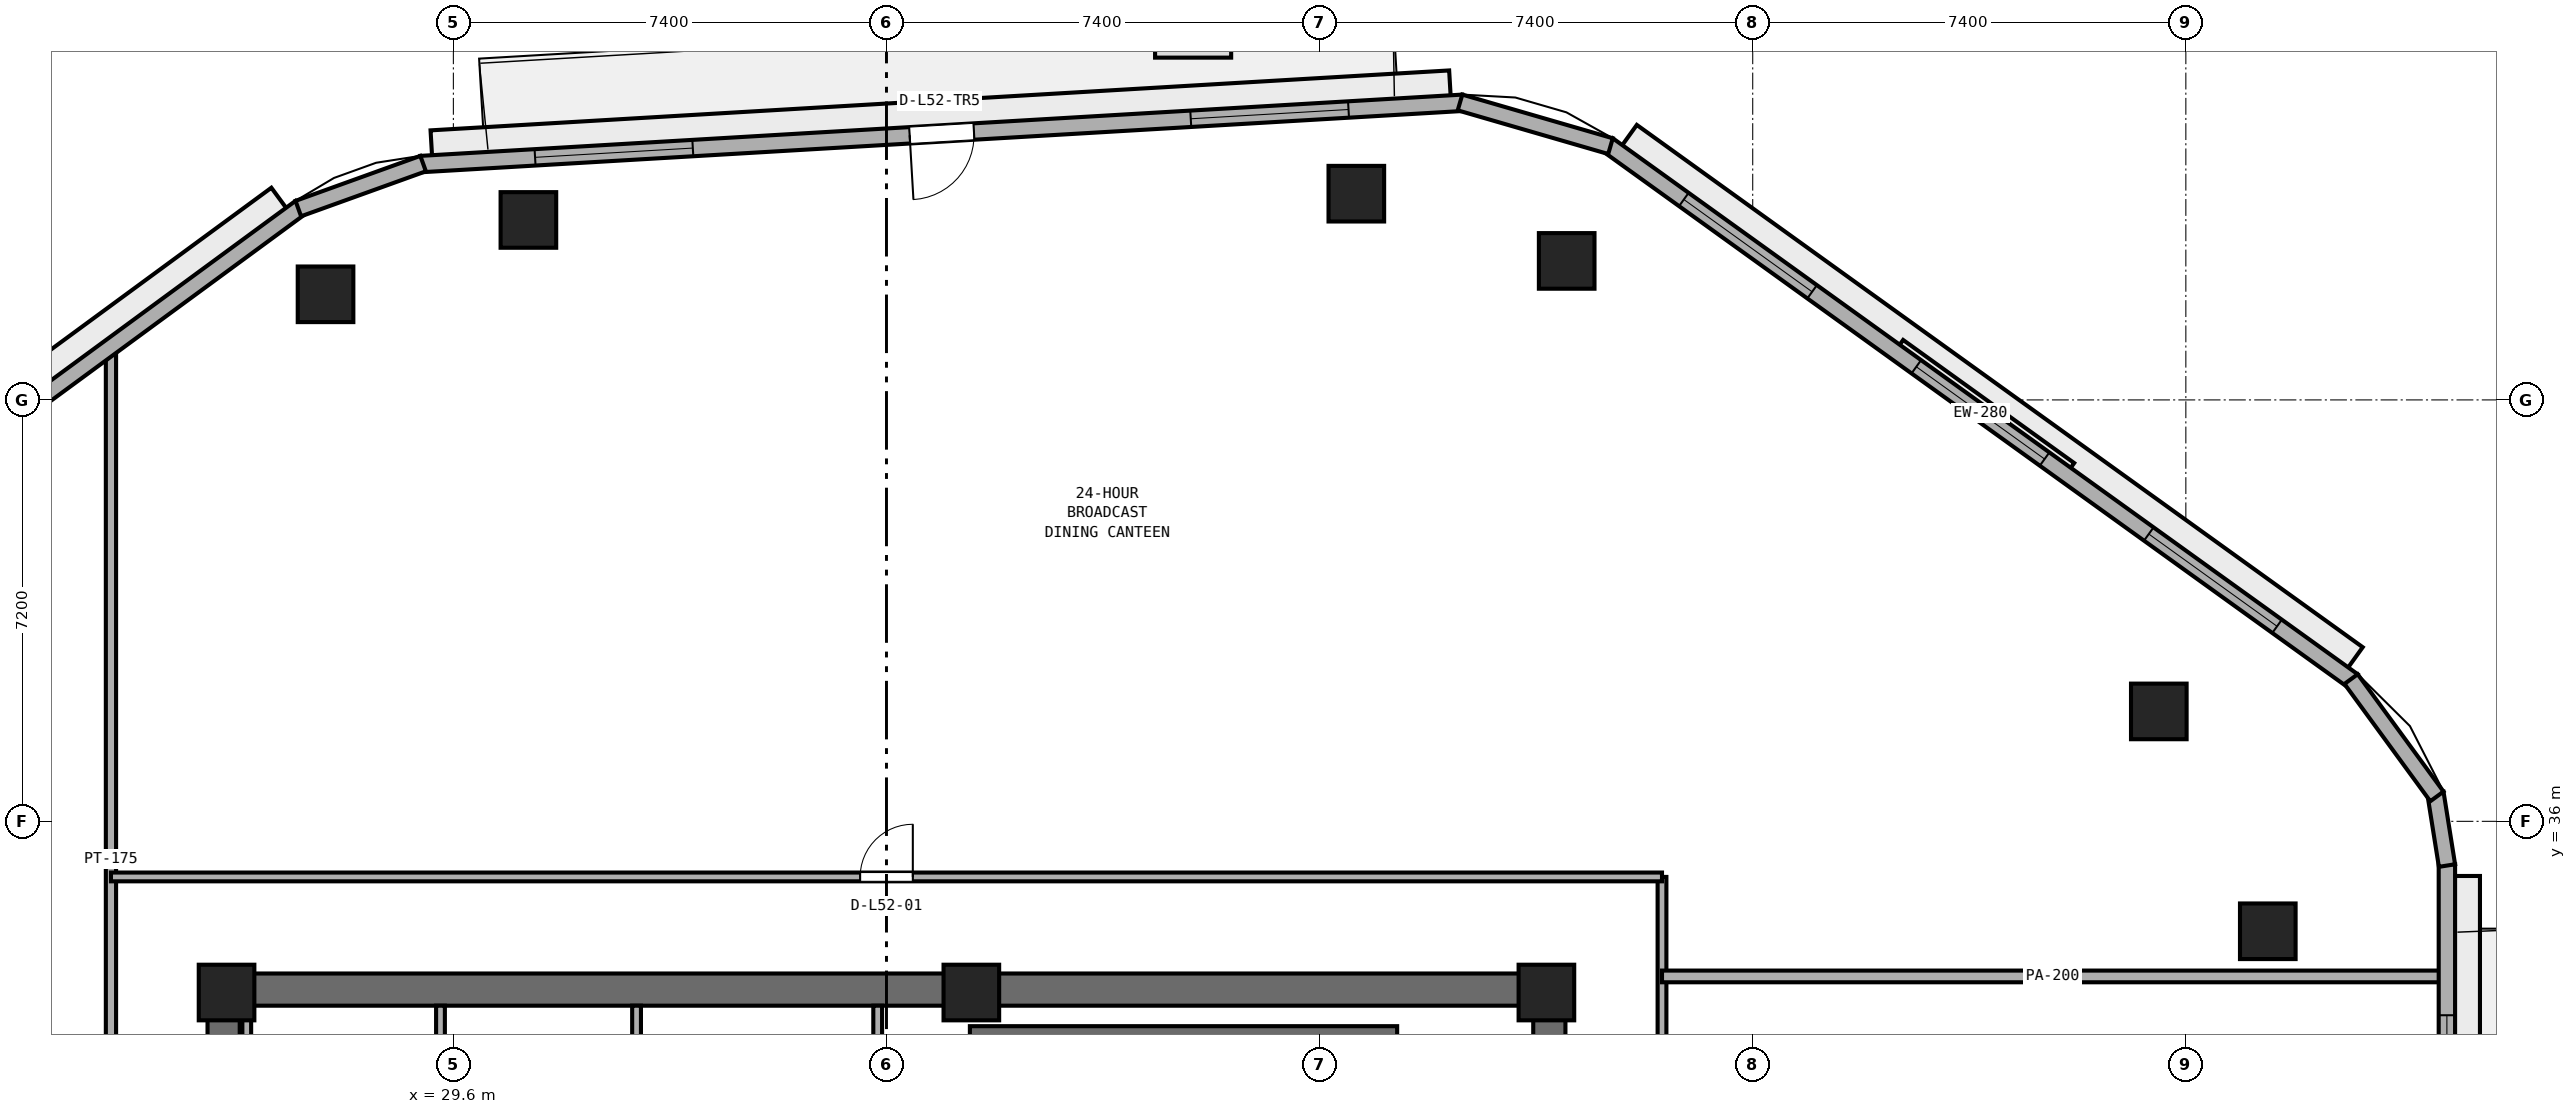
"""IFC4 building model, lengths in metres.
Left out: names, types, materials, properties, quantities, classifications, styles, units other than length and angle.
Written with IfcOpenShell. Run it as: python <this file> out.ifc"""

import sys

from ifc_helpers import new_model, si_unit, direction, frame, frame_2d, origin, origin_2d, place, context, subcontext, project, spatial, rectangle, extrude, element, fill, save


model = new_model("IFC4")
c1 = context("Model", 3, precision=1e-05, world=origin(), true_north=direction((0.0, 1.0)))
c2 = subcontext(c1, "Body", "Model", "MODEL_VIEW")
j1 = project(units=[si_unit("LENGTHUNIT", "METRE"), si_unit("PLANEANGLEUNIT", "RADIAN")], contexts=[c1])
p1 = place(None, origin())
s1 = spatial("IfcSite", under=j1, at=p1, CompositionType="ELEMENT")
p2 = place(p1, origin())
s2 = spatial("IfcBuilding", under=s1, at=p2, CompositionType="ELEMENT")
p3 = place(p2, frame((0.0, 0.0, 204.8)))
s3 = spatial("IfcBuildingStorey", under=s2, at=p3, CompositionType="ELEMENT", Elevation=204.8)
p4 = place(p3, frame((25.4, 33.125, 0.0), z_axis=(0.0, 0.0, 1.0), x_axis=(1.0, 0.0, 0.0)))
e1 = element("IfcWall", 1, at=p4, inside=s3, PredefinedType="SHEAR", context=c2, shape_type="SweptSolid", body=[
    extrude(rectangle(XDim=23.2, YDim=0.55, at=frame_2d((11.6, 0.0))), origin(), (0.0, 0.0, 1.0), 3.54),
])
p5 = place(p3, frame((25.675, 17.55, 0.0), z_axis=(0.0, 0.0, 1.0), x_axis=(0.0, 1.0, 0.0)))
e2 = element("IfcWall", 2, at=p5, inside=s3, PredefinedType="SHEAR", context=c2, shape_type="SweptSolid", body=[
    extrude(rectangle(XDim=15.3, YDim=0.55, at=frame_2d((7.65, 0.0))), origin(), (0.0, 0.0, 1.0), 3.54),
])
p6 = place(p5, frame((6.9, 0.0, 0.0)))
e3 = element("IfcOpeningElement", 3, at=p6, cuts=e2, PredefinedType="OPENING", context=c2, shape_type="SweptSolid", body=[
    extrude(rectangle(XDim=1.5, YDim=2.15, at=frame_2d((0.75, 1.075))), frame((0.0, 0.285, 0.0), z_axis=(0.0, -1.0, 0.0), x_axis=(1.0, 0.0, 0.0)), (0.0, 0.0, 1.0), 0.57),
])
p7 = place(p3, frame((48.325, 17.55, 0.0), z_axis=(0.0, 0.0, 1.0), x_axis=(0.0, 1.0, 0.0)))
e4 = element("IfcWall", 4, at=p7, inside=s3, PredefinedType="SHEAR", context=c2, shape_type="SweptSolid", body=[
    extrude(rectangle(XDim=15.3, YDim=0.55, at=frame_2d((7.65, 0.0))), origin(), (0.0, 0.0, 1.0), 3.54),
])
p8 = place(p7, frame((5.75, 0.0, 0.0)))
e5 = element("IfcOpeningElement", 5, at=p8, cuts=e4, PredefinedType="OPENING", context=c2, shape_type="SweptSolid", body=[
    extrude(rectangle(XDim=1.5, YDim=2.15, at=frame_2d((0.75, 1.075))), frame((0.0, 0.285, 0.0), z_axis=(0.0, -1.0, 0.0), x_axis=(1.0, 0.0, 0.0)), (0.0, 0.0, 1.0), 0.57),
])
for number, where, z_axis, x_axis in (
    (6, (48.275, 33.075, 0.0), (0.0, 0.0, 1.0), (1.0, 0.0, 0.0)),
    (7, (38.45, 33.075, 0.0), (0.0, 0.0, 1.0), (1.0, 0.0, 0.0)),
    (8, (25.725, 33.075, 0.0), (0.0, 0.0, 1.0), (1.0, 0.0, 0.0)),
):
    element("IfcColumn", number, at=place(p3, frame(where, z_axis=z_axis, x_axis=x_axis)), inside=s3, PredefinedType="PILASTER", context=c2, shape_type="SweptSolid", body=[
        extrude(rectangle(XDim=0.95, YDim=0.95, at=origin_2d()), origin(), (0.0, 0.0, 1.0), 3.8),
    ])
for number, where, z_axis, x_axis in (
    (9, (60.6, 34.122, 0.0), (0.0, 0.0, 1.0), (1.0, 0.0, 0.0)),
    (10, (58.738, 37.878, 0.0), (0.0, 0.0, 1.0), (1.0, 0.0, 0.0)),
    (11, (48.622, 45.575, 0.0), (0.0, 0.0, 1.0), (1.0, 0.0, 0.0)),
    (12, (45.028, 46.724, 0.0), (0.0, 0.0, 1.0), (1.0, 0.0, 0.0)),
    (13, (30.882, 46.275, 0.0), (0.0, 0.0, 1.0), (1.0, 0.0, 0.0)),
    (14, (27.416, 45.004, 0.0), (0.0, 0.0, 1.0), (1.0, 0.0, 0.0)),
):
    element("IfcColumn", number, at=place(p3, frame(where, z_axis=z_axis, x_axis=x_axis)), inside=s3, PredefinedType="COLUMN", context=c2, shape_type="SweptSolid", body=[
        extrude(rectangle(XDim=0.95, YDim=0.95, at=origin_2d()), origin(), (0.0, 0.0, 1.0), 3.8),
    ])
p9 = place(p3, frame((38.425, 32.375, 0.0), z_axis=(0.0, 0.0, 1.0), x_axis=(1.0, 0.0, 0.0)))
e15 = element("IfcWall", 15, at=p9, inside=s3, PredefinedType="SHEAR", context=c2, shape_type="SweptSolid", body=[
    extrude(rectangle(XDim=7.3, YDim=0.25, at=frame_2d((3.65, 0.0))), origin(), (0.0, 0.0, 1.0), 3.54),
])
p10 = place(p3, frame((26.07, 30.65, 0.0), z_axis=(0.0, 0.0, 1.0), x_axis=(0.0, 1.0, 0.0)))
e16 = element("IfcWall", 16, at=p10, inside=s3, PredefinedType="PARTITIONING", context=c2, shape_type="SweptSolid", body=[
    extrude(rectangle(XDim=2.2, YDim=0.15, at=frame_2d((1.1, 0.0))), origin(), (0.0, 0.0, 1.0), 2.64),
])
for number, where, z_axis, x_axis in (
    (17, (29.38, 30.65, 0.0), (0.0, 0.0, 1.0), (0.0, 1.0, 0.0)),
    (18, (32.73, 30.65, 0.0), (0.0, 0.0, 1.0), (0.0, 1.0, 0.0)),
    (19, (36.85, 30.65, 0.0), (0.0, 0.0, 1.0), (0.0, 1.0, 0.0)),
):
    element("IfcWall", number, at=place(p3, frame(where, z_axis=z_axis, x_axis=x_axis)), inside=s3, PredefinedType="PARTITIONING", context=c2, shape_type="SweptSolid", body=[
        extrude(rectangle(XDim=2.2, YDim=0.15, at=frame_2d((1.1, 0.0))), origin(), (0.0, 0.0, 1.0), 3.54),
    ])
p11 = place(p3, frame((50.25, 26.55, 0.0), z_axis=(0.0, 0.0, 1.0), x_axis=(0.0, 1.0, 0.0)))
e20 = element("IfcWall", 20, at=p11, inside=s3, PredefinedType="PARTITIONING", context=c2, shape_type="SweptSolid", body=[
    extrude(rectangle(XDim=8.5, YDim=0.15, at=frame_2d((4.25, 0.0))), origin(), (0.0, 0.0, 1.0), 3.54),
])
p12 = place(p3, frame((23.75, 26.55, 0.0), z_axis=(0.0, 0.0, 1.0), x_axis=(0.0, 1.0, 0.0)))
e21 = element("IfcWall", 21, at=p12, inside=s3, PredefinedType="PARTITIONING", context=c2, shape_type="SweptSolid", body=[
    extrude(rectangle(XDim=17.596, YDim=0.175, at=frame_2d((8.798, 0.0))), origin(), (0.0, 0.0, 1.0), 3.54),
])
p13 = place(p3, frame((50.25, 33.35, 0.0), z_axis=(0.0, 0.0, 1.0), x_axis=(1.0, 0.0, 0.0)))
e22 = element("IfcWall", 22, at=p13, inside=s3, PredefinedType="PARTITIONING", context=c2, shape_type="SweptSolid", body=[
    extrude(rectangle(XDim=13.345, YDim=0.2, at=frame_2d((6.672, 0.0))), origin(), (0.0, 0.0, 1.0), 2.79),
])
p14 = place(p3, frame((23.75, 35.05, 0.0), z_axis=(0.0, 0.0, 1.0), x_axis=(1.0, 0.0, 0.0)))
e23 = element("IfcWall", 23, at=p14, inside=s3, PredefinedType="PARTITIONING", context=c2, shape_type="SweptSolid", body=[
    extrude(rectangle(XDim=26.5, YDim=0.15, at=frame_2d((13.25, 0.0))), origin(), (0.0, 0.0, 1.0), 3.54),
])
p15 = place(p14, frame((12.8, 0.0, 0.0)))
e24 = element("IfcOpeningElement", 24, at=p15, cuts=e23, PredefinedType="OPENING", context=c2, shape_type="SweptSolid", body=[
    extrude(rectangle(XDim=0.9, YDim=2.1, at=frame_2d((0.45, 1.05))), frame((0.0, 0.085, 0.0), z_axis=(0.0, -1.0, 0.0), x_axis=(1.0, 0.0, 0.0)), (0.0, 0.0, 1.0), 0.17),
])
p16 = place(p3, frame((63.66, 16.39, 0.0), z_axis=(0.0, 0.0, 1.0), x_axis=(0.0, 1.0, 0.0)))
e25 = element("IfcWall", 25, at=p16, inside=s3, PredefinedType="STANDARD", context=c2, shape_type="SweptSolid", body=[
    extrude(rectangle(XDim=18.876, YDim=0.28, at=frame_2d((9.438, 0.0))), origin(), (0.0, 0.0, 1.0), 2.79),
])
p17 = place(p16, frame((8.588, 0.0, 0.0)))
e26 = element("IfcOpeningElement", 26, at=p17, cuts=e25, PredefinedType="OPENING", context=c2, shape_type="SweptSolid", body=[
    extrude(rectangle(XDim=1.1, YDim=2.2, at=frame_2d((0.55, 1.1))), frame((0.0, 0.15, 0.0), z_axis=(0.0, -1.0, 0.0), x_axis=(1.0, 0.0, 0.0)), (0.0, 0.0, 1.0), 0.3),
])
p18 = place(p16, frame((2.579, 0.0, 0.85)))
e27 = element("IfcOpeningElement", 27, at=p18, cuts=e25, PredefinedType="OPENING", context=c2, shape_type="SweptSolid", body=[
    extrude(rectangle(XDim=1.8, YDim=1.2, at=frame_2d((0.9, 0.6))), frame((0.0, 0.15, 0.0), z_axis=(0.0, -1.0, 0.0), x_axis=(1.0, 0.0, 0.0)), (0.0, 0.0, 1.0), 0.3),
])
p19 = place(p16, frame((14.497, 0.0, 0.85)))
e28 = element("IfcOpeningElement", 28, at=p19, cuts=e25, PredefinedType="OPENING", context=c2, shape_type="SweptSolid", body=[
    extrude(rectangle(XDim=1.8, YDim=1.2, at=frame_2d((0.9, 0.6))), frame((0.0, 0.15, 0.0), z_axis=(0.0, -1.0, 0.0), x_axis=(1.0, 0.0, 0.0)), (0.0, 0.0, 1.0), 0.3),
])
p20 = place(p3, frame((62.054, 38.399, 0.0), z_axis=(0.0, 0.0, 1.0), x_axis=(-0.81172124793, 0.584045045915, 0.0)))
e29 = element("IfcWall", 29, at=p20, inside=s3, PredefinedType="STANDARD", context=c2, shape_type="SweptSolid", body=[
    extrude(rectangle(XDim=15.679, YDim=0.28, at=frame_2d((7.84, 0.0))), origin(), (0.0, 0.0, 1.0), 3.54),
])
p21 = place(p20, frame((1.596, 0.0, 0.9)))
e30 = element("IfcOpeningElement", 30, at=p21, cuts=e29, PredefinedType="OPENING", context=c2, shape_type="SweptSolid", body=[
    extrude(rectangle(XDim=2.7, YDim=1.75, at=frame_2d((1.35, 0.875))), frame((0.0, 0.15, 0.0), z_axis=(0.0, -1.0, 0.0), x_axis=(1.0, 0.0, 0.0)), (0.0, 0.0, 1.0), 0.3),
])
p22 = place(p20, frame((6.49, 0.0, 0.9)))
e31 = element("IfcOpeningElement", 31, at=p22, cuts=e29, PredefinedType="OPENING", context=c2, shape_type="SweptSolid", body=[
    extrude(rectangle(XDim=2.7, YDim=1.75, at=frame_2d((1.35, 0.875))), frame((0.0, 0.15, 0.0), z_axis=(0.0, -1.0, 0.0), x_axis=(1.0, 0.0, 0.0)), (0.0, 0.0, 1.0), 0.3),
])
p23 = place(p20, frame((11.383, 0.0, 0.9)))
e32 = element("IfcOpeningElement", 32, at=p23, cuts=e29, PredefinedType="OPENING", context=c2, shape_type="SweptSolid", body=[
    extrude(rectangle(XDim=2.7, YDim=1.75, at=frame_2d((1.35, 0.875))), frame((0.0, 0.15, 0.0), z_axis=(0.0, -1.0, 0.0), x_axis=(1.0, 0.0, 0.0)), (0.0, 0.0, 1.0), 0.3),
])
p24 = place(p3, frame((46.846, 48.277, 0.0), z_axis=(0.0, 0.0, 1.0), x_axis=(-0.998273806631, -0.05873165241, 0.0)))
e33 = element("IfcWall", 33, at=p24, inside=s3, PredefinedType="STANDARD", context=c2, shape_type="SweptSolid", body=[
    extrude(rectangle(XDim=17.833, YDim=0.28, at=frame_2d((8.917, 0.0))), origin(), (0.0, 0.0, 1.0), 3.54),
])
p25 = place(p24, frame((8.366, 0.0, 0.0)))
e34 = element("IfcOpeningElement", 34, at=p25, cuts=e33, PredefinedType="OPENING", context=c2, shape_type="SweptSolid", body=[
    extrude(rectangle(XDim=1.1, YDim=2.2, at=frame_2d((0.55, 1.1))), frame((0.0, 0.15, 0.0), z_axis=(0.0, -1.0, 0.0), x_axis=(1.0, 0.0, 0.0)), (0.0, 0.0, 1.0), 0.3),
])
p26 = place(p24, frame((1.956, 0.0, 0.9)))
e35 = element("IfcOpeningElement", 35, at=p26, cuts=e33, PredefinedType="OPENING", context=c2, shape_type="SweptSolid", body=[
    extrude(rectangle(XDim=2.7, YDim=1.75, at=frame_2d((1.35, 0.875))), frame((0.0, 0.15, 0.0), z_axis=(0.0, -1.0, 0.0), x_axis=(1.0, 0.0, 0.0)), (0.0, 0.0, 1.0), 0.3),
])
p27 = place(p24, frame((13.177, 0.0, 0.9)))
e36 = element("IfcOpeningElement", 36, at=p27, cuts=e33, PredefinedType="OPENING", context=c2, shape_type="SweptSolid", body=[
    extrude(rectangle(XDim=2.7, YDim=1.75, at=frame_2d((1.35, 0.875))), frame((0.0, 0.15, 0.0), z_axis=(0.0, -1.0, 0.0), x_axis=(1.0, 0.0, 0.0)), (0.0, 0.0, 1.0), 0.3),
])
p28 = place(p3, frame((26.986, 46.488, 0.0), z_axis=(0.0, 0.0, 1.0), x_axis=(-0.806097783211, -0.59178236194, 0.0)))
e37 = element("IfcWall", 37, at=p28, inside=s3, PredefinedType="STANDARD", context=c2, shape_type="SweptSolid", body=[
    extrude(rectangle(XDim=16.959, YDim=0.28, at=frame_2d((8.479, 0.0))), origin(), (0.0, 0.0, 1.0), 3.54),
])
p29 = place(p28, frame((7.129, 0.0, 0.9)))
e38 = element("IfcOpeningElement", 38, at=p29, cuts=e37, PredefinedType="OPENING", context=c2, shape_type="SweptSolid", body=[
    extrude(rectangle(XDim=2.7, YDim=1.75, at=frame_2d((1.35, 0.875))), frame((0.0, 0.15, 0.0), z_axis=(0.0, -1.0, 0.0), x_axis=(1.0, 0.0, 0.0)), (0.0, 0.0, 1.0), 0.3),
])
p30 = place(p28, frame((12.449, 0.0, 0.9)))
e39 = element("IfcOpeningElement", 39, at=p30, cuts=e37, PredefinedType="OPENING", context=c2, shape_type="SweptSolid", body=[
    extrude(rectangle(XDim=2.7, YDim=1.75, at=frame_2d((1.35, 0.875))), frame((0.0, 0.15, 0.0), z_axis=(0.0, -1.0, 0.0), x_axis=(1.0, 0.0, 0.0)), (0.0, 0.0, 1.0), 0.3),
])
p31 = place(p3, frame((63.662, 35.244, 0.0), z_axis=(0.0, 0.0, 1.0), x_axis=(-0.157059104921, 0.987589204863, 0.0)))
e40 = element("IfcWall", 40, at=p31, inside=s3, PredefinedType="STANDARD", context=c2, shape_type="SweptSolid", body=[
    extrude(rectangle(XDim=1.258, YDim=0.28, at=frame_2d((0.629, 0.0))), origin(), (0.0, 0.0, 1.0), 3.54),
])
p32 = place(p3, frame((63.489, 36.426, 0.0), z_axis=(0.0, 0.0, 1.0), x_axis=(-0.590267940876, 0.80720738226, 0.0)))
e41 = element("IfcWall", 41, at=p32, inside=s3, PredefinedType="STANDARD", context=c2, shape_type="SweptSolid", body=[
    extrude(rectangle(XDim=2.484, YDim=0.28, at=frame_2d((1.242, 0.0))), origin(), (0.0, 0.0, 1.0), 3.54),
])
p33 = place(p3, frame((49.37, 47.536, 0.0), z_axis=(0.0, 0.0, 1.0), x_axis=(-0.960380089791, 0.278693529048, 0.0)))
e42 = element("IfcWall", 42, at=p33, inside=s3, PredefinedType="STANDARD", context=c2, shape_type="SweptSolid", body=[
    extrude(rectangle(XDim=2.677, YDim=0.28, at=frame_2d((1.338, 0.0))), origin(), (0.0, 0.0, 1.0), 3.54),
])
p34 = place(p3, frame((29.083, 47.238, 0.0), z_axis=(0.0, 0.0, 1.0), x_axis=(-0.940723909279, -0.33917329864, 0.0)))
e43 = element("IfcWall", 43, at=p34, inside=s3, PredefinedType="STANDARD", context=c2, shape_type="SweptSolid", body=[
    extrude(rectangle(XDim=2.267, YDim=0.28, at=frame_2d((1.133, 0.0))), origin(), (0.0, 0.0, 1.0), 3.54),
])
p35 = place(p15, origin())
e44 = element("IfcDoor", 44, at=p35, inside=s3, OperationType="SINGLE_SWING_RIGHT", PredefinedType="DOOR", context=c2, shape_type="SweptSolid", body=[
    extrude(rectangle(XDim=0.9, YDim=2.1, at=frame_2d((0.45, 1.05))), frame((0.0, 0.025, 0.0), z_axis=(0.0, -1.0, 0.0), x_axis=(1.0, 0.0, 0.0)), (0.0, 0.0, 1.0), 0.05),
])
fill(e24, e44)
p36 = place(p19, origin())
e45 = element("IfcWindow", 45, at=p36, inside=s3, PartitioningType="SINGLE_PANEL", PredefinedType="WINDOW", context=c2, shape_type="SweptSolid", body=[
    extrude(rectangle(XDim=1.8, YDim=1.2, at=frame_2d((0.9, 0.6))), frame((0.0, 0.03, 0.0), z_axis=(0.0, -1.0, 0.0), x_axis=(1.0, 0.0, 0.0)), (0.0, 0.0, 1.0), 0.06),
])
fill(e28, e45)
p37 = place(p21, origin())
e46 = element("IfcWindow", 46, at=p37, inside=s3, PartitioningType="SINGLE_PANEL", PredefinedType="WINDOW", context=c2, shape_type="SweptSolid", body=[
    extrude(rectangle(XDim=2.7, YDim=1.75, at=frame_2d((1.35, 0.875))), frame((0.0, 0.03, 0.0), z_axis=(0.0, -1.0, 0.0), x_axis=(1.0, 0.0, 0.0)), (0.0, 0.0, 1.0), 0.06),
])
fill(e30, e46)
p38 = place(p22, origin())
e47 = element("IfcWindow", 47, at=p38, inside=s3, PartitioningType="SINGLE_PANEL", PredefinedType="WINDOW", context=c2, shape_type="SweptSolid", body=[
    extrude(rectangle(XDim=2.7, YDim=1.75, at=frame_2d((1.35, 0.875))), frame((0.0, 0.03, 0.0), z_axis=(0.0, -1.0, 0.0), x_axis=(1.0, 0.0, 0.0)), (0.0, 0.0, 1.0), 0.06),
])
fill(e31, e47)
p39 = place(p23, origin())
e48 = element("IfcWindow", 48, at=p39, inside=s3, PartitioningType="SINGLE_PANEL", PredefinedType="WINDOW", context=c2, shape_type="SweptSolid", body=[
    extrude(rectangle(XDim=2.7, YDim=1.75, at=frame_2d((1.35, 0.875))), frame((0.0, 0.03, 0.0), z_axis=(0.0, -1.0, 0.0), x_axis=(1.0, 0.0, 0.0)), (0.0, 0.0, 1.0), 0.06),
])
fill(e32, e48)
p40 = place(p25, origin())
e49 = element("IfcDoor", 49, at=p40, inside=s3, OperationType="SINGLE_SWING_RIGHT", PredefinedType="DOOR", context=c2, shape_type="SweptSolid", body=[
    extrude(rectangle(XDim=1.1, YDim=2.2, at=frame_2d((0.55, 1.1))), frame((0.0, 0.025, 0.0), z_axis=(0.0, -1.0, 0.0), x_axis=(1.0, 0.0, 0.0)), (0.0, 0.0, 1.0), 0.05),
])
fill(e34, e49)
p41 = place(p26, origin())
e50 = element("IfcWindow", 50, at=p41, inside=s3, PartitioningType="SINGLE_PANEL", PredefinedType="WINDOW", context=c2, shape_type="SweptSolid", body=[
    extrude(rectangle(XDim=2.7, YDim=1.75, at=frame_2d((1.35, 0.875))), frame((0.0, 0.03, 0.0), z_axis=(0.0, -1.0, 0.0), x_axis=(1.0, 0.0, 0.0)), (0.0, 0.0, 1.0), 0.06),
])
fill(e35, e50)
p42 = place(p27, origin())
e51 = element("IfcWindow", 51, at=p42, inside=s3, PartitioningType="SINGLE_PANEL", PredefinedType="WINDOW", context=c2, shape_type="SweptSolid", body=[
    extrude(rectangle(XDim=2.7, YDim=1.75, at=frame_2d((1.35, 0.875))), frame((0.0, 0.03, 0.0), z_axis=(0.0, -1.0, 0.0), x_axis=(1.0, 0.0, 0.0)), (0.0, 0.0, 1.0), 0.06),
])
fill(e36, e51)
save(model, sys.argv[1])
